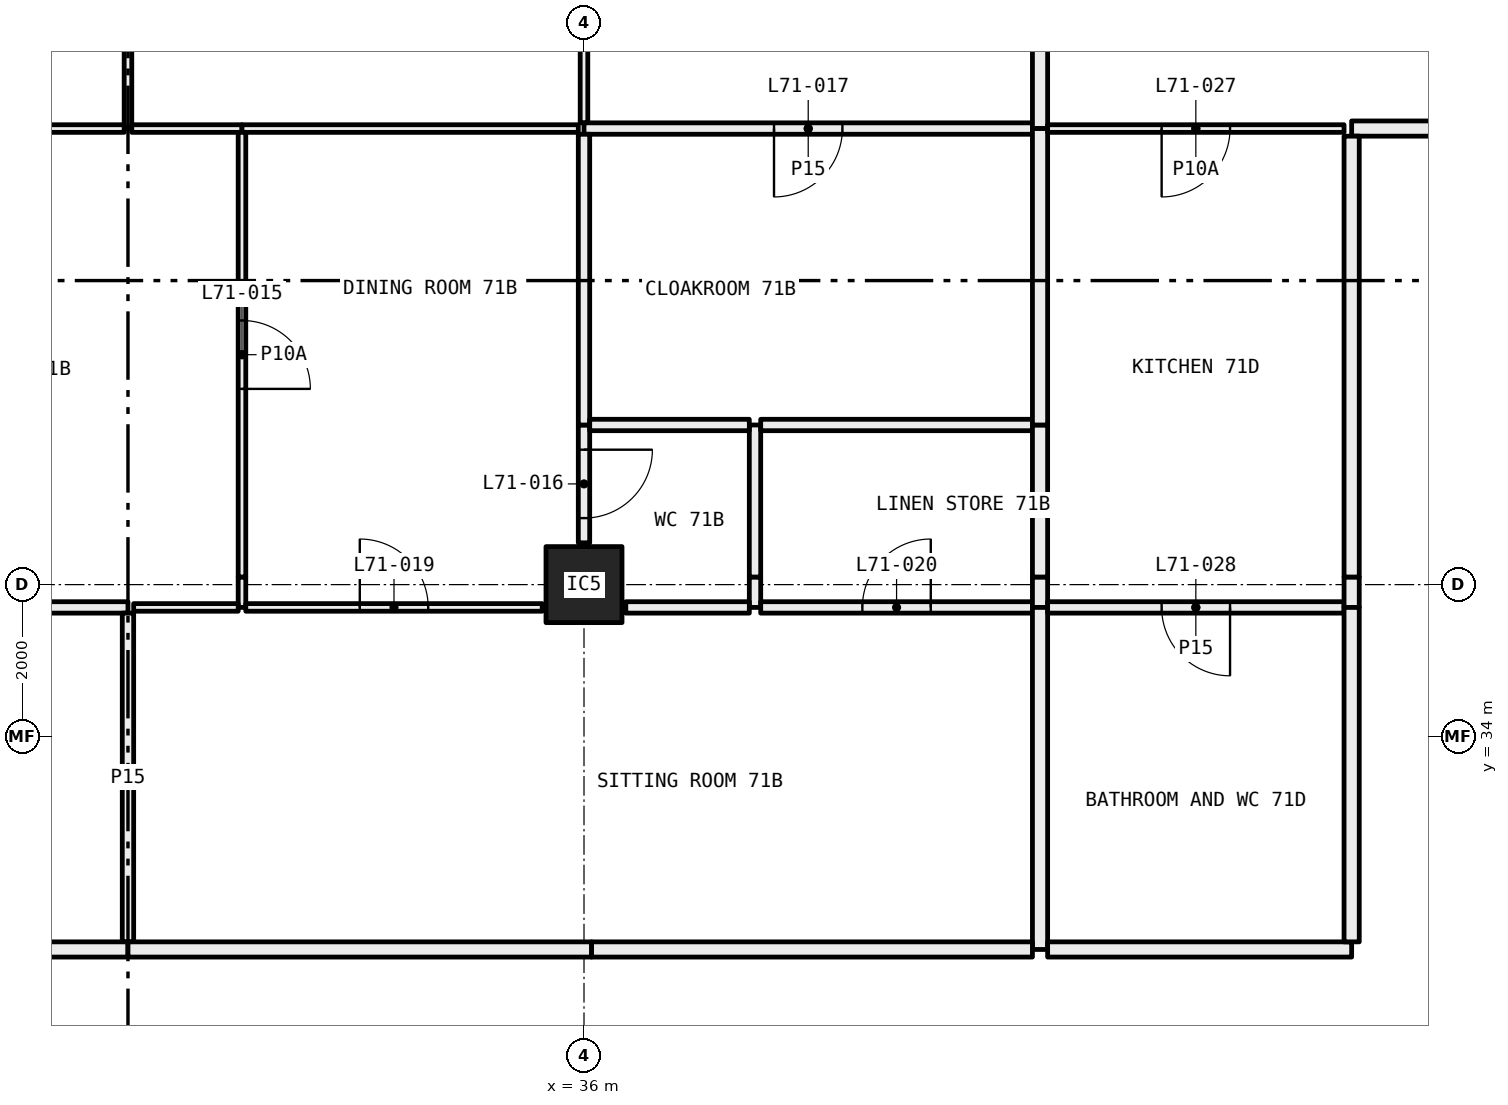
"""IFC4 building model, lengths in metres.
Left out: names, types, materials, properties, quantities, classifications, styles, units other than length and angle.
Written with IfcOpenShell. Run it as: python <this file> out.ifc"""

import sys

from ifc_helpers import new_model, si_unit, direction, frame, frame_2d, origin, origin_2d, place, context, subcontext, project, spatial, rectangle, hollow_rectangle, extrude, element, fill, save


model = new_model("IFC4")
c1 = context("Model", 3, precision=1e-05, world=origin(), true_north=direction((0.0, 1.0)))
c2 = subcontext(c1, "Body", "Model", "MODEL_VIEW")
j1 = project(units=[si_unit("LENGTHUNIT", "METRE"), si_unit("PLANEANGLEUNIT", "RADIAN")], contexts=[c1])
p1 = place(None, origin())
s1 = spatial("IfcSite", under=j1, at=p1, CompositionType="ELEMENT")
p2 = place(p1, origin())
s2 = spatial("IfcBuilding", under=s1, at=p2, CompositionType="ELEMENT")
p3 = place(p2, frame((0.0, 0.0, 262.8)))
s3 = spatial("IfcBuildingStorey", under=s2, at=p3, CompositionType="ELEMENT", Elevation=262.8)
p4 = place(p3, frame((36.0, 36.0, 0.0), z_axis=(0.0, 0.0, 1.0), x_axis=(1.0, 0.0, 0.0)))
e1 = element("IfcColumn", 1, at=p4, inside=s3, PredefinedType="COLUMN", context=c2, shape_type="SweptSolid", body=[
    extrude(hollow_rectangle(XDim=1.0, YDim=1.0, WallThickness=0.04, at=origin_2d()), origin(), (0.0, 0.0, 1.0), 3.05),
])
p5 = place(p3, frame((30.0, 42.0, 0.0), z_axis=(0.0, 0.0, 1.0), x_axis=(0.0, 1.0, 0.0)))
e2 = element("IfcWall", 2, at=p5, inside=s3, PredefinedType="PARTITIONING", context=c2, shape_type="SweptSolid", body=[
    extrude(rectangle(XDim=5.28, YDim=0.1, at=frame_2d((2.64, 0.0))), origin(), (0.0, 0.0, 1.0), 3.05),
])
p6 = place(p5, frame((2.19, 0.0, 0.0)))
e3 = element("IfcOpeningElement", 3, at=p6, cuts=e2, PredefinedType="OPENING", context=c2, shape_type="SweptSolid", body=[
    extrude(rectangle(XDim=0.9, YDim=2.1, at=frame_2d((0.45, 1.05))), frame((0.0, 0.06, 0.0), z_axis=(0.0, -1.0, 0.0), x_axis=(1.0, 0.0, 0.0)), (0.0, 0.0, 1.0), 0.12),
])
p7 = place(p3, frame((26.0, 42.0, 0.0), z_axis=(0.0, 0.0, 1.0), x_axis=(1.0, 0.0, 0.0)))
e4 = element("IfcWall", 4, at=p7, inside=s3, PredefinedType="PARTITIONING", context=c2, shape_type="SweptSolid", body=[
    extrude(rectangle(XDim=3.95, YDim=0.1, at=frame_2d((1.975, 0.0))), origin(), (0.0, 0.0, 1.0), 3.05),
])
p8 = place(p7, frame((1.525, 0.0, 0.0)))
e5 = element("IfcOpeningElement", 5, at=p8, cuts=e4, PredefinedType="OPENING", context=c2, shape_type="SweptSolid", body=[
    extrude(rectangle(XDim=0.9, YDim=2.1, at=frame_2d((0.45, 1.05))), frame((0.0, 0.06, 0.0), z_axis=(0.0, -1.0, 0.0), x_axis=(1.0, 0.0, 0.0)), (0.0, 0.0, 1.0), 0.12),
])
p9 = place(p3, frame((36.0, 42.075, 0.0), z_axis=(0.0, 0.0, 1.0), x_axis=(0.0, 1.0, 0.0)))
e6 = element("IfcWall", 6, at=p9, inside=s3, PredefinedType="PARTITIONING", context=c2, shape_type="SweptSolid", body=[
    extrude(rectangle(XDim=5.205, YDim=0.1, at=frame_2d((2.603, 0.0))), origin(), (0.0, 0.0, 1.0), 2.45),
])
p10 = place(p9, frame((2.153, 0.0, 0.0)))
e7 = element("IfcOpeningElement", 7, at=p10, cuts=e6, PredefinedType="OPENING", context=c2, shape_type="SweptSolid", body=[
    extrude(rectangle(XDim=0.9, YDim=2.1, at=frame_2d((0.45, 1.05))), frame((0.0, 0.06, 0.0), z_axis=(0.0, -1.0, 0.0), x_axis=(1.0, 0.0, 0.0)), (0.0, 0.0, 1.0), 0.12),
])
p11 = place(p3, frame((30.05, 42.0, 0.0), z_axis=(0.0, 0.0, 1.0), x_axis=(1.0, 0.0, 0.0)))
e8 = element("IfcWall", 8, at=p11, inside=s3, PredefinedType="PARTITIONING", context=c2, shape_type="SweptSolid", body=[
    extrude(rectangle(XDim=1.45, YDim=0.1, at=frame_2d((0.725, 0.0))), origin(), (0.0, 0.0, 1.0), 3.05),
])
p12 = place(p3, frame((31.5, 42.0, 0.0), z_axis=(0.0, 0.0, 1.0), x_axis=(1.0, 0.0, 0.0)))
e9 = element("IfcWall", 9, at=p12, inside=s3, PredefinedType="PARTITIONING", context=c2, shape_type="SweptSolid", body=[
    extrude(rectangle(XDim=4.425, YDim=0.1, at=frame_2d((2.212, 0.0))), origin(), (0.0, 0.0, 1.0), 2.45),
])
p13 = place(p3, frame((36.0, 42.0, 0.0), z_axis=(0.0, 0.0, 1.0), x_axis=(1.0, 0.0, 0.0)))
e10 = element("IfcWall", 10, at=p13, inside=s3, PredefinedType="PARTITIONING", context=c2, shape_type="SweptSolid", body=[
    extrude(rectangle(XDim=5.9, YDim=0.15, at=frame_2d((2.95, 0.0))), origin(), (0.0, 0.0, 1.0), 2.45),
])
p14 = place(p13, frame((2.5, 0.0, 0.0)))
e11 = element("IfcOpeningElement", 11, at=p14, cuts=e10, PredefinedType="OPENING", context=c2, shape_type="SweptSolid", body=[
    extrude(rectangle(XDim=0.9, YDim=2.1, at=frame_2d((0.45, 1.05))), frame((0.0, 0.085, 0.0), z_axis=(0.0, -1.0, 0.0), x_axis=(1.0, 0.0, 0.0)), (0.0, 0.0, 1.0), 0.17),
])
p15 = place(p3, frame((42.0, 42.0, 0.0), z_axis=(0.0, 0.0, 1.0), x_axis=(0.0, 1.0, 0.0)))
e12 = element("IfcWall", 12, at=p15, inside=s3, PredefinedType="PARTITIONING", context=c2, shape_type="SweptSolid", body=[
    extrude(rectangle(XDim=5.28, YDim=0.2, at=frame_2d((2.64, 0.0))), origin(), (0.0, 0.0, 1.0), 3.05),
])
p16 = place(p3, frame((31.5, 35.7, 0.0), z_axis=(0.0, 0.0, 1.0), x_axis=(0.0, 1.0, 0.0)))
e13 = element("IfcWall", 13, at=p16, inside=s3, PredefinedType="PARTITIONING", context=c2, shape_type="SweptSolid", body=[
    extrude(rectangle(XDim=0.4, YDim=0.1, at=frame_2d((0.2, 0.0))), origin(), (0.0, 0.0, 1.0), 2.45),
])
p17 = place(p3, frame((31.5, 36.1, 0.0), z_axis=(0.0, 0.0, 1.0), x_axis=(0.0, 1.0, 0.0)))
e14 = element("IfcWall", 14, at=p17, inside=s3, PredefinedType="PARTITIONING", context=c2, shape_type="SweptSolid", body=[
    extrude(rectangle(XDim=5.85, YDim=0.1, at=frame_2d((2.925, 0.0))), origin(), (0.0, 0.0, 1.0), 3.05),
])
p18 = place(p17, frame((2.475, 0.0, 0.0)))
e15 = element("IfcOpeningElement", 15, at=p18, cuts=e14, PredefinedType="OPENING", context=c2, shape_type="SweptSolid", body=[
    extrude(rectangle(XDim=0.9, YDim=2.1, at=frame_2d((0.45, 1.05))), frame((0.0, 0.06, 0.0), z_axis=(0.0, -1.0, 0.0), x_axis=(1.0, 0.0, 0.0)), (0.0, 0.0, 1.0), 0.12),
])
p19 = place(p3, frame((26.0, 35.7, 0.0), z_axis=(0.0, 0.0, 1.0), x_axis=(1.0, 0.0, 0.0)))
e16 = element("IfcWall", 16, at=p19, inside=s3, PredefinedType="PARTITIONING", context=c2, shape_type="SweptSolid", body=[
    extrude(rectangle(XDim=4.0, YDim=0.15, at=frame_2d((2.0, 0.0))), origin(), (0.0, 0.0, 1.0), 3.05),
])
p20 = place(p19, frame((1.55, 0.0, 0.0)))
e17 = element("IfcOpeningElement", 17, at=p20, cuts=e16, PredefinedType="OPENING", context=c2, shape_type="SweptSolid", body=[
    extrude(rectangle(XDim=0.9, YDim=2.1, at=frame_2d((0.45, 1.05))), frame((0.0, 0.085, 0.0), z_axis=(0.0, -1.0, 0.0), x_axis=(1.0, 0.0, 0.0)), (0.0, 0.0, 1.0), 0.17),
])
p21 = place(p3, frame((30.075, 35.7, 0.0), z_axis=(0.0, 0.0, 1.0), x_axis=(1.0, 0.0, 0.0)))
e18 = element("IfcWall", 18, at=p21, inside=s3, PredefinedType="PARTITIONING", context=c2, shape_type="SweptSolid", body=[
    extrude(rectangle(XDim=1.375, YDim=0.1, at=frame_2d((0.688, 0.0))), origin(), (0.0, 0.0, 1.0), 3.05),
])
p22 = place(p3, frame((36.0, 36.55, 0.0), z_axis=(0.0, 0.0, 1.0), x_axis=(0.0, 1.0, 0.0)))
e19 = element("IfcWall", 19, at=p22, inside=s3, PredefinedType="PARTITIONING", context=c2, shape_type="SweptSolid", body=[
    extrude(rectangle(XDim=1.55, YDim=0.15, at=frame_2d((0.775, 0.0))), origin(), (0.0, 0.0, 1.0), 2.45),
])
p23 = place(p22, frame((0.325, 0.0, 0.0)))
e20 = element("IfcOpeningElement", 20, at=p23, cuts=e19, PredefinedType="OPENING", context=c2, shape_type="SweptSolid", body=[
    extrude(rectangle(XDim=0.9, YDim=2.1, at=frame_2d((0.45, 1.05))), frame((0.0, 0.085, 0.0), z_axis=(0.0, -1.0, 0.0), x_axis=(1.0, 0.0, 0.0)), (0.0, 0.0, 1.0), 0.17),
])
p24 = place(p3, frame((36.0, 38.1, 0.0), z_axis=(0.0, 0.0, 1.0), x_axis=(0.0, 1.0, 0.0)))
e21 = element("IfcWall", 21, at=p24, inside=s3, PredefinedType="PARTITIONING", context=c2, shape_type="SweptSolid", body=[
    extrude(rectangle(XDim=3.825, YDim=0.15, at=frame_2d((1.913, 0.0))), origin(), (0.0, 0.0, 1.0), 2.45),
])
p25 = place(p3, frame((31.55, 35.7, 0.0), z_axis=(0.0, 0.0, 1.0), x_axis=(1.0, 0.0, 0.0)))
e22 = element("IfcWall", 22, at=p25, inside=s3, PredefinedType="PARTITIONING", context=c2, shape_type="SweptSolid", body=[
    extrude(rectangle(XDim=3.9, YDim=0.1, at=frame_2d((1.95, 0.0))), origin(), (0.0, 0.0, 1.0), 3.05),
])
p26 = place(p25, frame((1.5, 0.0, 0.0)))
e23 = element("IfcOpeningElement", 23, at=p26, cuts=e22, PredefinedType="OPENING", context=c2, shape_type="SweptSolid", body=[
    extrude(rectangle(XDim=0.9, YDim=2.1, at=frame_2d((0.45, 1.05))), frame((0.0, 0.06, 0.0), z_axis=(0.0, -1.0, 0.0), x_axis=(1.0, 0.0, 0.0)), (0.0, 0.0, 1.0), 0.12),
])
p27 = place(p3, frame((38.25, 35.7, 0.0), z_axis=(0.0, 0.0, 1.0), x_axis=(0.0, 1.0, 0.0)))
e24 = element("IfcWall", 24, at=p27, inside=s3, PredefinedType="PARTITIONING", context=c2, shape_type="SweptSolid", body=[
    extrude(rectangle(XDim=0.4, YDim=0.15, at=frame_2d((0.2, 0.0))), origin(), (0.0, 0.0, 1.0), 2.45),
])
p28 = place(p3, frame((38.25, 36.1, 0.0), z_axis=(0.0, 0.0, 1.0), x_axis=(0.0, 1.0, 0.0)))
e25 = element("IfcWall", 25, at=p28, inside=s3, PredefinedType="PARTITIONING", context=c2, shape_type="SweptSolid", body=[
    extrude(rectangle(XDim=2.0, YDim=0.15, at=frame_2d((1.0, 0.0))), origin(), (0.0, 0.0, 1.0), 3.05),
])
p29 = place(p3, frame((38.175, 38.1, 0.0), z_axis=(0.0, 0.0, 1.0), x_axis=(-1.0, 0.0, 0.0)))
e26 = element("IfcWall", 26, at=p29, inside=s3, PredefinedType="PARTITIONING", context=c2, shape_type="SweptSolid", body=[
    extrude(rectangle(XDim=2.1, YDim=0.15, at=frame_2d((1.05, 0.0))), origin(), (0.0, 0.0, 1.0), 2.45),
])
p30 = place(p3, frame((36.55, 35.7, 0.0), z_axis=(0.0, 0.0, 1.0), x_axis=(1.0, 0.0, 0.0)))
e27 = element("IfcWall", 27, at=p30, inside=s3, PredefinedType="PARTITIONING", context=c2, shape_type="SweptSolid", body=[
    extrude(rectangle(XDim=1.625, YDim=0.15, at=frame_2d((0.812, 0.0))), origin(), (0.0, 0.0, 1.0), 3.05),
])
p31 = place(p3, frame((41.9, 38.1, 0.0), z_axis=(0.0, 0.0, 1.0), x_axis=(-1.0, 0.0, 0.0)))
e28 = element("IfcWall", 28, at=p31, inside=s3, PredefinedType="PARTITIONING", context=c2, shape_type="SweptSolid", body=[
    extrude(rectangle(XDim=3.575, YDim=0.15, at=frame_2d((1.788, 0.0))), origin(), (0.0, 0.0, 1.0), 3.05),
])
p32 = place(p3, frame((38.325, 35.7, 0.0), z_axis=(0.0, 0.0, 1.0), x_axis=(1.0, 0.0, 0.0)))
e29 = element("IfcWall", 29, at=p32, inside=s3, PredefinedType="PARTITIONING", context=c2, shape_type="SweptSolid", body=[
    extrude(rectangle(XDim=3.575, YDim=0.15, at=frame_2d((1.788, 0.0))), origin(), (0.0, 0.0, 1.0), 3.05),
])
p33 = place(p32, frame((1.337, 0.0, 0.0)))
e30 = element("IfcOpeningElement", 30, at=p33, cuts=e29, PredefinedType="OPENING", context=c2, shape_type="SweptSolid", body=[
    extrude(rectangle(XDim=0.9, YDim=2.1, at=frame_2d((0.45, 1.05))), frame((0.0, 0.085, 0.0), z_axis=(0.0, -1.0, 0.0), x_axis=(1.0, 0.0, 0.0)), (0.0, 0.0, 1.0), 0.17),
])
p34 = place(p3, frame((42.0, 35.7, 0.0), z_axis=(0.0, 0.0, 1.0), x_axis=(0.0, 1.0, 0.0)))
e31 = element("IfcWall", 31, at=p34, inside=s3, PredefinedType="PARTITIONING", context=c2, shape_type="SweptSolid", body=[
    extrude(rectangle(XDim=0.4, YDim=0.2, at=frame_2d((0.2, 0.0))), origin(), (0.0, 0.0, 1.0), 2.45),
])
p35 = place(p3, frame((42.0, 36.1, 0.0), z_axis=(0.0, 0.0, 1.0), x_axis=(0.0, 1.0, 0.0)))
e32 = element("IfcWall", 32, at=p35, inside=s3, PredefinedType="PARTITIONING", context=c2, shape_type="SweptSolid", body=[
    extrude(rectangle(XDim=2.0, YDim=0.2, at=frame_2d((1.0, 0.0))), origin(), (0.0, 0.0, 1.0), 3.05),
])
p36 = place(p3, frame((42.0, 38.1, 0.0), z_axis=(0.0, 0.0, 1.0), x_axis=(0.0, 1.0, 0.0)))
e33 = element("IfcWall", 33, at=p36, inside=s3, PredefinedType="PARTITIONING", context=c2, shape_type="SweptSolid", body=[
    extrude(rectangle(XDim=3.9, YDim=0.2, at=frame_2d((1.95, 0.0))), origin(), (0.0, 0.0, 1.0), 3.05),
])
p37 = place(p3, frame((30.0, 31.3, 0.0), z_axis=(0.0, 0.0, 1.0), x_axis=(0.0, 1.0, 0.0)))
e34 = element("IfcWall", 34, at=p37, inside=s3, PredefinedType="PARTITIONING", context=c2, shape_type="SweptSolid", body=[
    extrude(rectangle(XDim=4.325, YDim=0.15, at=frame_2d((2.163, 0.0))), origin(), (0.0, 0.0, 1.0), 3.05),
])
p38 = place(p3, frame((26.0, 31.2, 0.0), z_axis=(0.0, 0.0, 1.0), x_axis=(1.0, 0.0, 0.0)))
e35 = element("IfcWall", 35, at=p38, inside=s3, PredefinedType="PARTITIONING", context=c2, shape_type="SweptSolid", body=[
    extrude(rectangle(XDim=4.0, YDim=0.2, at=frame_2d((2.0, 0.0))), origin(), (0.0, 0.0, 1.0), 3.05),
])
p39 = place(p3, frame((42.0, 31.2, 0.0), z_axis=(0.0, 0.0, 1.0), x_axis=(0.0, 1.0, 0.0)))
e36 = element("IfcWall", 36, at=p39, inside=s3, PredefinedType="PARTITIONING", context=c2, shape_type="SweptSolid", body=[
    extrude(rectangle(XDim=4.5, YDim=0.2, at=frame_2d((2.25, 0.0))), origin(), (0.0, 0.0, 1.0), 3.05),
])
p40 = place(p3, frame((30.0, 31.2, 0.0), z_axis=(0.0, 0.0, 1.0), x_axis=(1.0, 0.0, 0.0)))
e37 = element("IfcWall", 37, at=p40, inside=s3, PredefinedType="PARTITIONING", context=c2, shape_type="SweptSolid", body=[
    extrude(rectangle(XDim=6.1, YDim=0.2, at=frame_2d((3.05, 0.0))), origin(), (0.0, 0.0, 1.0), 2.45),
])
p41 = place(p3, frame((36.1, 31.2, 0.0), z_axis=(0.0, 0.0, 1.0), x_axis=(1.0, 0.0, 0.0)))
e38 = element("IfcWall", 38, at=p41, inside=s3, PredefinedType="PARTITIONING", context=c2, shape_type="SweptSolid", body=[
    extrude(rectangle(XDim=5.8, YDim=0.2, at=frame_2d((2.9, 0.0))), origin(), (0.0, 0.0, 1.0), 3.05),
])
p42 = place(p3, frame((42.1, 42.0, 0.0), z_axis=(0.0, 0.0, 1.0), x_axis=(1.0, 0.0, 0.0)))
e39 = element("IfcWall", 39, at=p42, inside=s3, PredefinedType="PARTITIONING", context=c2, shape_type="SweptSolid", body=[
    extrude(rectangle(XDim=3.9, YDim=0.1, at=frame_2d((1.95, 0.0))), origin(), (0.0, 0.0, 1.0), 3.05),
])
p43 = place(p42, frame((1.5, 0.0, 0.0)))
e40 = element("IfcOpeningElement", 40, at=p43, cuts=e39, PredefinedType="OPENING", context=c2, shape_type="SweptSolid", body=[
    extrude(rectangle(XDim=0.9, YDim=2.1, at=frame_2d((0.45, 1.05))), frame((0.0, 0.06, 0.0), z_axis=(0.0, -1.0, 0.0), x_axis=(1.0, 0.0, 0.0)), (0.0, 0.0, 1.0), 0.12),
])
p44 = place(p3, frame((46.1, 42.0, 0.0), z_axis=(0.0, 0.0, 1.0), x_axis=(1.0, 0.0, 0.0)))
e41 = element("IfcWall", 41, at=p44, inside=s3, PredefinedType="PARTITIONING", context=c2, shape_type="SweptSolid", body=[
    extrude(rectangle(XDim=1.9, YDim=0.2, at=frame_2d((0.95, 0.0))), origin(), (0.0, 0.0, 1.0), 3.05),
])
p45 = place(p3, frame((42.1, 35.7, 0.0), z_axis=(0.0, 0.0, 1.0), x_axis=(1.0, 0.0, 0.0)))
e42 = element("IfcWall", 42, at=p45, inside=s3, PredefinedType="PARTITIONING", context=c2, shape_type="SweptSolid", body=[
    extrude(rectangle(XDim=3.9, YDim=0.15, at=frame_2d((1.95, 0.0))), origin(), (0.0, 0.0, 1.0), 3.05),
])
p46 = place(p45, frame((1.5, 0.0, 0.0)))
e43 = element("IfcOpeningElement", 43, at=p46, cuts=e42, PredefinedType="OPENING", context=c2, shape_type="SweptSolid", body=[
    extrude(rectangle(XDim=0.9, YDim=2.1, at=frame_2d((0.45, 1.05))), frame((0.0, 0.085, 0.0), z_axis=(0.0, -1.0, 0.0), x_axis=(1.0, 0.0, 0.0)), (0.0, 0.0, 1.0), 0.17),
])
p47 = place(p3, frame((46.1, 35.7, 0.0), z_axis=(0.0, 0.0, 1.0), x_axis=(0.0, 1.0, 0.0)))
e44 = element("IfcWall", 44, at=p47, inside=s3, PredefinedType="PARTITIONING", context=c2, shape_type="SweptSolid", body=[
    extrude(rectangle(XDim=0.4, YDim=0.2, at=frame_2d((0.2, 0.0))), origin(), (0.0, 0.0, 1.0), 2.45),
])
p48 = place(p3, frame((46.1, 36.1, 0.0), z_axis=(0.0, 0.0, 1.0), x_axis=(0.0, 1.0, 0.0)))
e45 = element("IfcWall", 45, at=p48, inside=s3, PredefinedType="PARTITIONING", context=c2, shape_type="SweptSolid", body=[
    extrude(rectangle(XDim=5.8, YDim=0.2, at=frame_2d((2.9, 0.0))), origin(), (0.0, 0.0, 1.0), 3.05),
])
p49 = place(p3, frame((42.1, 31.2, 0.0), z_axis=(0.0, 0.0, 1.0), x_axis=(1.0, 0.0, 0.0)))
e46 = element("IfcWall", 46, at=p49, inside=s3, PredefinedType="PARTITIONING", context=c2, shape_type="SweptSolid", body=[
    extrude(rectangle(XDim=4.0, YDim=0.2, at=frame_2d((2.0, 0.0))), origin(), (0.0, 0.0, 1.0), 3.05),
])
p50 = place(p3, frame((46.1, 31.3, 0.0), z_axis=(0.0, 0.0, 1.0), x_axis=(0.0, 1.0, 0.0)))
e47 = element("IfcWall", 47, at=p50, inside=s3, PredefinedType="PARTITIONING", context=c2, shape_type="SweptSolid", body=[
    extrude(rectangle(XDim=4.4, YDim=0.2, at=frame_2d((2.2, 0.0))), origin(), (0.0, 0.0, 1.0), 3.05),
])
p51 = place(p18, frame((0.9, 0.0, 0.0), x_axis=(-1.0, 0.0, 0.0)))
e48 = element("IfcDoor", 48, at=p51, inside=s3, OperationType="SINGLE_SWING_LEFT", PredefinedType="DOOR", context=c2, shape_type="SweptSolid", body=[
    extrude(rectangle(XDim=0.9, YDim=2.1, at=frame_2d((0.45, 1.05))), frame((0.0, 0.025, 0.0), z_axis=(0.0, -1.0, 0.0), x_axis=(1.0, 0.0, 0.0)), (0.0, 0.0, 1.0), 0.05),
])
fill(e15, e48)
p52 = place(p23, frame((0.9, 0.0, 0.0), x_axis=(-1.0, 0.0, 0.0)))
e49 = element("IfcDoor", 49, at=p52, inside=s3, OperationType="SINGLE_SWING_RIGHT", PredefinedType="DOOR", context=c2, shape_type="SweptSolid", body=[
    extrude(rectangle(XDim=0.9, YDim=2.1, at=frame_2d((0.45, 1.05))), frame((0.0, 0.025, 0.0), z_axis=(0.0, -1.0, 0.0), x_axis=(1.0, 0.0, 0.0)), (0.0, 0.0, 1.0), 0.05),
])
fill(e20, e49)
p53 = place(p14, frame((0.9, 0.0, 0.0), x_axis=(-1.0, 0.0, 0.0)))
e50 = element("IfcDoor", 50, at=p53, inside=s3, OperationType="SINGLE_SWING_LEFT", PredefinedType="DOOR", context=c2, shape_type="SweptSolid", body=[
    extrude(rectangle(XDim=0.9, YDim=2.1, at=frame_2d((0.45, 1.05))), frame((0.0, 0.025, 0.0), z_axis=(0.0, -1.0, 0.0), x_axis=(1.0, 0.0, 0.0)), (0.0, 0.0, 1.0), 0.05),
])
fill(e11, e50)
p54 = place(p26, origin())
e51 = element("IfcDoor", 51, at=p54, inside=s3, OperationType="SINGLE_SWING_RIGHT", PredefinedType="DOOR", context=c2, shape_type="SweptSolid", body=[
    extrude(rectangle(XDim=0.9, YDim=2.1, at=frame_2d((0.45, 1.05))), frame((0.0, 0.025, 0.0), z_axis=(0.0, -1.0, 0.0), x_axis=(1.0, 0.0, 0.0)), (0.0, 0.0, 1.0), 0.05),
])
fill(e23, e51)
p55 = place(p33, origin())
e52 = element("IfcDoor", 52, at=p55, inside=s3, OperationType="SINGLE_SWING_LEFT", PredefinedType="DOOR", context=c2, shape_type="SweptSolid", body=[
    extrude(rectangle(XDim=0.9, YDim=2.1, at=frame_2d((0.45, 1.05))), frame((0.0, 0.025, 0.0), z_axis=(0.0, -1.0, 0.0), x_axis=(1.0, 0.0, 0.0)), (0.0, 0.0, 1.0), 0.05),
])
fill(e30, e52)
p56 = place(p43, frame((0.9, 0.0, 0.0), x_axis=(-1.0, 0.0, 0.0)))
e53 = element("IfcDoor", 53, at=p56, inside=s3, OperationType="SINGLE_SWING_LEFT", PredefinedType="DOOR", context=c2, shape_type="SweptSolid", body=[
    extrude(rectangle(XDim=0.9, YDim=2.1, at=frame_2d((0.45, 1.05))), frame((0.0, 0.025, 0.0), z_axis=(0.0, -1.0, 0.0), x_axis=(1.0, 0.0, 0.0)), (0.0, 0.0, 1.0), 0.05),
])
fill(e40, e53)
p57 = place(p46, frame((0.9, 0.0, 0.0), x_axis=(-1.0, 0.0, 0.0)))
e54 = element("IfcDoor", 54, at=p57, inside=s3, OperationType="SINGLE_SWING_RIGHT", PredefinedType="DOOR", context=c2, shape_type="SweptSolid", body=[
    extrude(rectangle(XDim=0.9, YDim=2.1, at=frame_2d((0.45, 1.05))), frame((0.0, 0.025, 0.0), z_axis=(0.0, -1.0, 0.0), x_axis=(1.0, 0.0, 0.0)), (0.0, 0.0, 1.0), 0.05),
])
fill(e43, e54)
save(model, sys.argv[1])
